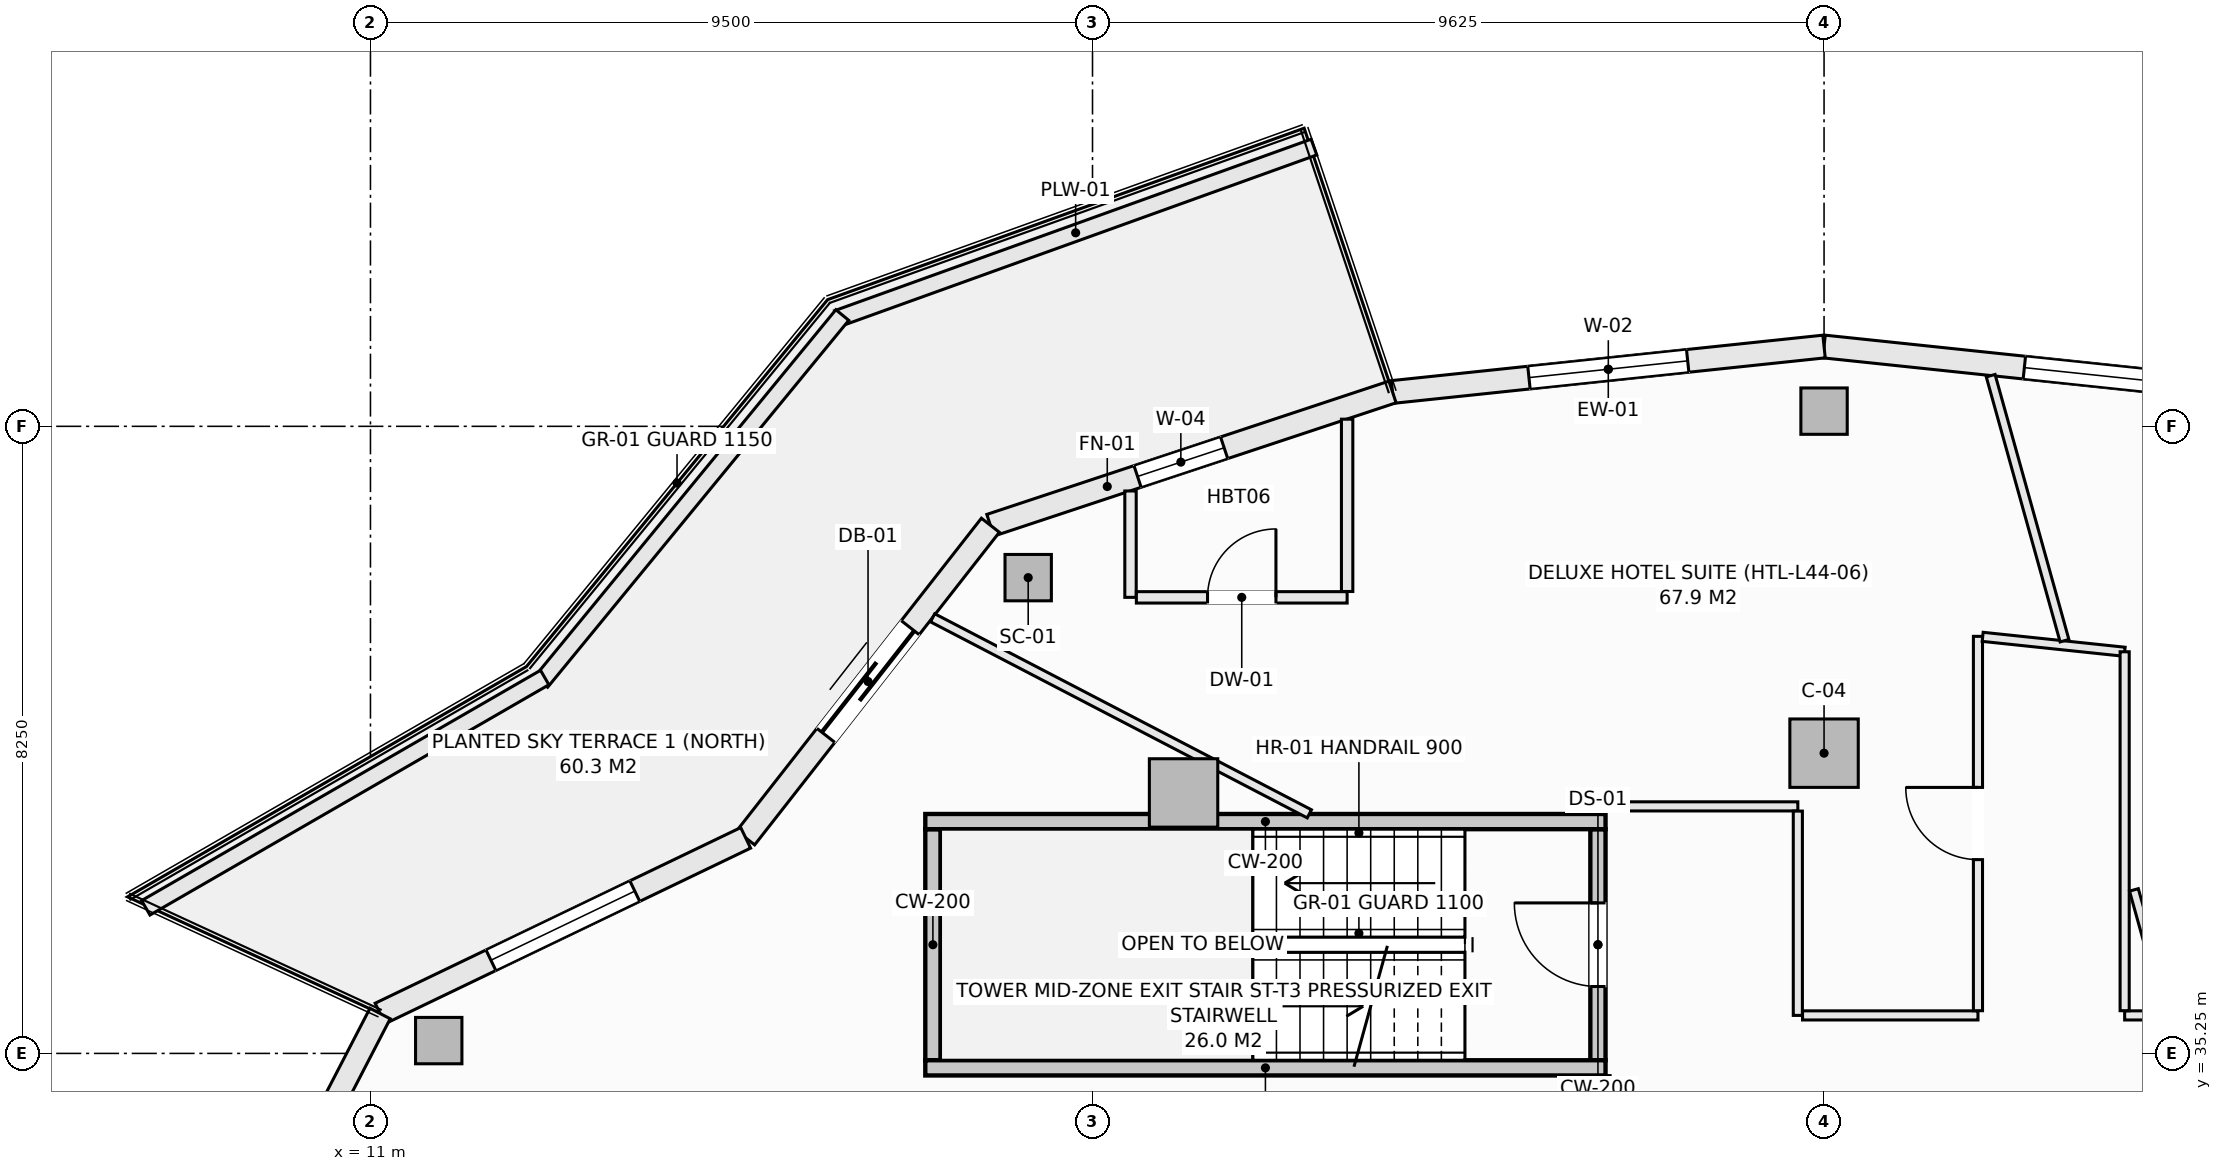
"""IFC4 building model, lengths in metres.
Left out: names, types, materials, properties, quantities, classifications, styles, units other than length and angle.
Written with IfcOpenShell. Run it as: python <this file> out.ifc"""

import sys

from ifc_helpers import new_model, si_unit, direction, frame, frame_2d, origin, origin_2d, place, context, subcontext, project, spatial, rectangle, hollow_rectangle, extrude, element, fill, save


model = new_model("IFC4")
c1 = context("Model", 3, precision=1e-05, world=origin(), true_north=direction((0.0, 1.0)))
c2 = subcontext(c1, "Body", "Model", "MODEL_VIEW")
j1 = project(units=[si_unit("LENGTHUNIT", "METRE"), si_unit("PLANEANGLEUNIT", "RADIAN")], contexts=[c1])
p1 = place(None, origin())
s1 = spatial("IfcSite", under=j1, at=p1, CompositionType="ELEMENT")
p2 = place(p1, origin())
s2 = spatial("IfcBuilding", under=s1, at=p2, CompositionType="ELEMENT")
p3 = place(p2, frame((0.0, 0.0, 169.9)))
s3 = spatial("IfcBuildingStorey", under=s2, at=p3, CompositionType="ELEMENT", Elevation=169.9)
for number, where, z_axis, x_axis in (
    (1, (30.125, 43.7, -0.27), (0.0, 0.0, 1.0), (1.0, 0.0, 0.0)),
    (2, (19.654, 41.51, -0.27), (0.0, 0.0, 1.0), (1.0, 0.0, 0.0)),
    (3, (11.898, 35.419, -0.27), (0.0, 0.0, 1.0), (1.0, 0.0, 0.0)),
):
    element("IfcColumn", number, at=place(p3, frame(where, z_axis=z_axis, x_axis=x_axis)), inside=s3, PredefinedType="COLUMN", context=c2, shape_type="SweptSolid", body=[
        extrude(hollow_rectangle(XDim=0.61, YDim=0.61, WallThickness=0.025, at=origin_2d()), origin(), (0.0, 0.0, 1.0), 3.4),
    ])
for number, where, z_axis, x_axis in (
    (4, (30.125, 39.2, -0.27), (0.0, 0.0, 1.0), (1.0, 0.0, 0.0)),
    (5, (21.698, 38.677, -0.27), (0.0, 0.0, 1.0), (1.0, 0.0, 0.0)),
):
    element("IfcColumn", number, at=place(p3, frame(where, z_axis=z_axis, x_axis=x_axis)), inside=s3, PredefinedType="COLUMN", context=c2, shape_type="SweptSolid", body=[
        extrude(rectangle(XDim=0.9, YDim=0.9, at=origin_2d()), origin(), (0.0, 0.0, 1.0), 3.4),
    ])
p4 = place(p3, frame((30.125, 44.55, 0.0), z_axis=(0.0, 0.0, 1.0), x_axis=(0.994496545245, -0.104769372887, 0.0)))
e6 = element("IfcWall", 6, at=p4, inside=s3, PredefinedType="SOLIDWALL", context=c2, shape_type="SweptSolid", body=[
    extrude(rectangle(XDim=5.709, YDim=0.3, at=frame_2d((2.854, 0.0))), origin(), (0.0, 0.0, 1.0), 2.653),
])
p5 = place(p4, frame((2.65, 0.0, 0.74)))
e7 = element("IfcOpeningElement", 7, at=p5, cuts=e6, PredefinedType="OPENING", context=c2, shape_type="SweptSolid", body=[
    extrude(rectangle(XDim=2.1, YDim=1.7, at=frame_2d((1.05, 0.85))), frame((0.0, 0.16, 0.0), z_axis=(0.0, -1.0, 0.0), x_axis=(1.0, 0.0, 0.0)), (0.0, 0.0, 1.0), 0.32),
])
p6 = place(p3, frame((24.447, 43.952, 0.0), z_axis=(0.0, 0.0, 1.0), x_axis=(0.994496545245, 0.104769372887, 0.0)))
e8 = element("IfcWall", 8, at=p6, inside=s3, PredefinedType="SOLIDWALL", context=c2, shape_type="SweptSolid", body=[
    extrude(rectangle(XDim=5.709, YDim=0.3, at=frame_2d((2.854, 0.0))), origin(), (0.0, 0.0, 1.0), 2.653),
])
p7 = place(p6, frame((1.805, 0.0, 0.74)))
e9 = element("IfcOpeningElement", 9, at=p7, cuts=e8, PredefinedType="OPENING", context=c2, shape_type="SweptSolid", body=[
    extrude(rectangle(XDim=2.1, YDim=1.7, at=frame_2d((1.05, 0.85))), frame((0.0, 0.16, 0.0), z_axis=(0.0, -1.0, 0.0), x_axis=(1.0, 0.0, 0.0)), (0.0, 0.0, 1.0), 0.32),
])
p8 = place(p3, frame((19.156, 42.199, 0.0), z_axis=(0.0, 0.0, 1.0), x_axis=(0.949246811547, 0.314532177636, 0.0)))
e10 = element("IfcWall", 10, at=p8, inside=s3, PredefinedType="SOLIDWALL", context=c2, shape_type="SweptSolid", body=[
    extrude(rectangle(XDim=5.574, YDim=0.3, at=frame_2d((2.787, 0.0))), origin(), (0.0, 0.0, 1.0), 2.653),
])
p9 = place(p8, frame((2.04, 0.0, 0.72)))
e11 = element("IfcOpeningElement", 11, at=p9, cuts=e10, PredefinedType="OPENING", context=c2, shape_type="SweptSolid", body=[
    extrude(rectangle(XDim=1.2, YDim=1.65, at=frame_2d((0.6, 0.825))), frame((0.0, 0.16, 0.0), z_axis=(0.0, -1.0, 0.0), x_axis=(1.0, 0.0, 0.0)), (0.0, 0.0, 1.0), 0.32),
])
p10 = place(p3, frame((15.937, 38.086, 0.0), z_axis=(0.0, 0.0, 1.0), x_axis=(0.616429245738, 0.787410302828, 0.0)))
e12 = element("IfcWall", 12, at=p10, inside=s3, PredefinedType="SOLIDWALL", context=c2, shape_type="SweptSolid", body=[
    extrude(rectangle(XDim=5.223, YDim=0.3, at=frame_2d((2.612, 0.0))), origin(), (0.0, 0.0, 1.0), 2.653),
])
p11 = place(p10, frame((1.712, 0.0, 0.0)))
e13 = element("IfcOpeningElement", 13, at=p11, cuts=e12, PredefinedType="OPENING", context=c2, shape_type="SweptSolid", body=[
    extrude(rectangle(XDim=1.8, YDim=2.25, at=frame_2d((0.9, 1.125))), frame((0.0, 0.16, 0.0), z_axis=(0.0, -1.0, 0.0), x_axis=(1.0, 0.0, 0.0)), (0.0, 0.0, 1.0), 0.32),
])
p12 = place(p3, frame((11.127, 35.775, 0.0), z_axis=(0.0, 0.0, 1.0), x_axis=(0.901353070301, 0.433085029363, 0.0)))
e14 = element("IfcWall", 14, at=p12, inside=s3, PredefinedType="SOLIDWALL", context=c2, shape_type="SweptSolid", body=[
    extrude(rectangle(XDim=5.336, YDim=0.3, at=frame_2d((2.668, 0.0))), origin(), (0.0, 0.0, 1.0), 2.653),
])
p13 = place(p12, frame((1.618, 0.0, 0.74)))
e15 = element("IfcOpeningElement", 15, at=p13, cuts=e14, PredefinedType="OPENING", context=c2, shape_type="SweptSolid", body=[
    extrude(rectangle(XDim=2.1, YDim=1.7, at=frame_2d((1.05, 0.85))), frame((0.0, 0.16, 0.0), z_axis=(0.0, -1.0, 0.0), x_axis=(1.0, 0.0, 0.0)), (0.0, 0.0, 1.0), 0.32),
])
p14 = place(p3, frame((8.935, 31.542, 0.0), z_axis=(0.0, 0.0, 1.0), x_axis=(0.459810251451, 0.888017191647, 0.0)))
e16 = element("IfcWall", 16, at=p14, inside=s3, PredefinedType="SOLIDWALL", context=c2, shape_type="SweptSolid", body=[
    extrude(rectangle(XDim=4.766, YDim=0.3, at=frame_2d((2.383, 0.0))), origin(), (0.0, 0.0, 1.0), 2.653),
])
p15 = place(p14, frame((1.333, 0.0, 0.74)))
e17 = element("IfcOpeningElement", 17, at=p15, cuts=e16, PredefinedType="OPENING", context=c2, shape_type="SweptSolid", body=[
    extrude(rectangle(XDim=2.1, YDim=1.7, at=frame_2d((1.05, 0.85))), frame((0.0, 0.16, 0.0), z_axis=(0.0, -1.0, 0.0), x_axis=(1.0, 0.0, 0.0)), (0.0, 0.0, 1.0), 0.32),
])
p16 = place(p3, frame((17.143, 44.918, 0.0), z_axis=(0.0, 0.0, 1.0), x_axis=(0.94094437769, 0.33856118811, 0.0)))
e18 = element("IfcWall", 18, at=p16, inside=s3, PredefinedType="PARAPET", context=c2, shape_type="SweptSolid", body=[
    extrude(rectangle(XDim=6.664, YDim=0.22, at=frame_2d((3.332, 0.0))), origin(), (0.0, 0.0, 1.0), 0.52),
])
p17 = place(p3, frame((13.246, 40.137, 0.0), z_axis=(0.0, 0.0, 1.0), x_axis=(0.634429234628, 0.77298094818, 0.0)))
e19 = element("IfcWall", 19, at=p17, inside=s3, PredefinedType="PARAPET", context=c2, shape_type="SweptSolid", body=[
    extrude(rectangle(XDim=6.245, YDim=0.22, at=frame_2d((3.123, 0.0))), origin(), (0.0, 0.0, 1.0), 0.52),
])
p18 = place(p3, frame((8.044, 37.166, 0.0), z_axis=(0.0, 0.0, 1.0), x_axis=(0.866058128659, 0.499943314571, 0.0)))
e20 = element("IfcWall", 20, at=p18, inside=s3, PredefinedType="PARAPET", context=c2, shape_type="SweptSolid", body=[
    extrude(rectangle(XDim=6.06, YDim=0.22, at=frame_2d((3.03, 0.0))), origin(), (0.0, 0.0, 1.0), 0.52),
])
p19 = place(p3, frame((27.15, 35.16, -0.27), z_axis=(0.0, 0.0, 1.0), x_axis=(0.0, 1.0, 0.0)))
e21 = element("IfcWall", 21, at=p19, inside=s3, PredefinedType="SHEAR", context=c2, shape_type="SweptSolid", body=[
    extrude(rectangle(XDim=3.04, YDim=0.2, at=frame_2d((1.52, 0.0))), origin(), (0.0, 0.0, 1.0), 3.4),
])
p20 = place(p19, frame((0.97, 0.0, 0.27)))
e22 = element("IfcOpeningElement", 22, at=p20, cuts=e21, PredefinedType="OPENING", context=c2, shape_type="SweptSolid", body=[
    extrude(rectangle(XDim=1.1, YDim=2.15, at=frame_2d((0.55, 1.075))), frame((0.0, 0.11, 0.0), z_axis=(0.0, -1.0, 0.0), x_axis=(1.0, 0.0, 0.0)), (0.0, 0.0, 1.0), 0.22),
])
p21 = place(p3, frame((18.4, 35.16, -0.27), z_axis=(0.0, 0.0, 1.0), x_axis=(0.0, 1.0, 0.0)))
e23 = element("IfcWall", 23, at=p21, inside=s3, PredefinedType="SHEAR", context=c2, shape_type="SweptSolid", body=[
    extrude(rectangle(XDim=3.04, YDim=0.2, at=frame_2d((1.52, 0.0))), origin(), (0.0, 0.0, 1.0), 3.4),
])
for number, where, z_axis, x_axis in (
    (24, (18.3, 38.3, -0.27), (0.0, 0.0, 1.0), (1.0, 0.0, 0.0)),
    (25, (18.3, 35.06, -0.27), (0.0, 0.0, 1.0), (1.0, 0.0, 0.0)),
):
    element("IfcWall", number, at=place(p3, frame(where, z_axis=z_axis, x_axis=x_axis)), inside=s3, PredefinedType="SHEAR", context=c2, shape_type="SweptSolid", body=[
        extrude(rectangle(XDim=8.95, YDim=0.2, at=frame_2d((4.475, 0.0))), origin(), (0.0, 0.0, 1.0), 3.4),
    ])
p22 = place(p3, frame((27.25, 34.152, 0.0), z_axis=(0.0, 0.0, 1.0), x_axis=(0.0, 1.0, 0.0)))
e26 = element("IfcWall", 26, at=p22, inside=s3, PredefinedType="PARTITIONING", context=c2, shape_type="SweptSolid", body=[
    extrude(rectangle(XDim=0.806, YDim=0.12, at=frame_2d((0.403, 0.0))), origin(), (0.0, 0.0, 1.0), 3.13),
])
p23 = place(p3, frame((27.25, 38.5, 0.0), z_axis=(0.0, 0.0, 1.0), x_axis=(1.0, 0.0, 0.0)))
e27 = element("IfcWall", 27, at=p23, inside=s3, PredefinedType="PARTITIONING", context=c2, shape_type="SweptSolid", body=[
    extrude(rectangle(XDim=2.53, YDim=0.12, at=frame_2d((1.265, 0.0))), origin(), (0.0, 0.0, 1.0), 3.13),
])
p24 = place(p3, frame((29.78, 35.75, 0.0), z_axis=(0.0, 0.0, 1.0), x_axis=(0.0, 1.0, 0.0)))
e28 = element("IfcWall", 28, at=p24, inside=s3, PredefinedType="PARTITIONING", context=c2, shape_type="SweptSolid", body=[
    extrude(rectangle(XDim=2.688, YDim=0.12, at=frame_2d((1.344, 0.0))), origin(), (0.0, 0.0, 1.0), 3.13),
])
p25 = place(p3, frame((29.842, 35.75, 0.0), z_axis=(0.0, 0.0, 1.0), x_axis=(1.0, 0.0, 0.0)))
e29 = element("IfcWall", 29, at=p25, inside=s3, PredefinedType="PARTITIONING", context=c2, shape_type="SweptSolid", body=[
    extrude(rectangle(XDim=2.308, YDim=0.12, at=frame_2d((1.154, 0.0))), origin(), (0.0, 0.0, 1.0), 3.13),
])
p26 = place(p3, frame((34.08, 35.75, 0.0), z_axis=(0.0, 0.0, 1.0), x_axis=(1.0, 0.0, 0.0)))
e30 = element("IfcWall", 30, at=p26, inside=s3, PredefinedType="PARTITIONING", context=c2, shape_type="SweptSolid", body=[
    extrude(rectangle(XDim=4.878, YDim=0.12, at=frame_2d((2.439, 0.0))), origin(), (0.0, 0.0, 1.0), 2.505),
])
p27 = place(p26, frame((1.485, 0.0, 0.0)))
e31 = element("IfcOpeningElement", 31, at=p27, cuts=e30, PredefinedType="OPENING", context=c2, shape_type="SweptSolid", body=[
    extrude(rectangle(XDim=0.95, YDim=2.1, at=frame_2d((0.475, 1.05))), frame((0.0, 0.07, 0.0), z_axis=(0.0, -1.0, 0.0), x_axis=(1.0, 0.0, 0.0)), (0.0, 0.0, 1.0), 0.14),
])
p28 = place(p3, frame((32.15, 35.812, 0.0), z_axis=(0.0, 0.0, 1.0), x_axis=(0.0, 1.0, 0.0)))
e32 = element("IfcWall", 32, at=p28, inside=s3, PredefinedType="PARTITIONING", context=c2, shape_type="SweptSolid", body=[
    extrude(rectangle(XDim=4.925, YDim=0.12, at=frame_2d((2.462, 0.0))), origin(), (0.0, 0.0, 1.0), 3.13),
])
p29 = place(p28, frame((1.988, 0.0, 0.0)))
e33 = element("IfcOpeningElement", 33, at=p29, cuts=e32, PredefinedType="OPENING", context=c2, shape_type="SweptSolid", body=[
    extrude(rectangle(XDim=0.95, YDim=2.1, at=frame_2d((0.475, 1.05))), frame((0.0, 0.07, 0.0), z_axis=(0.0, -1.0, 0.0), x_axis=(1.0, 0.0, 0.0)), (0.0, 0.0, 1.0), 0.14),
])
p30 = place(p3, frame((32.212, 40.73, 0.0), z_axis=(0.0, 0.0, 1.0), x_axis=(0.994511860417, -0.104623895405, 0.0)))
e34 = element("IfcWall", 34, at=p30, inside=s3, PredefinedType="PARTITIONING", context=c2, shape_type="SweptSolid", body=[
    extrude(rectangle(XDim=1.878, YDim=0.12, at=frame_2d((0.939, 0.0))), origin(), (0.0, 0.0, 1.0), 3.13),
])
p31 = place(p3, frame((34.08, 35.812, 0.0), z_axis=(0.0, 0.0, 1.0), x_axis=(0.0, 1.0, 0.0)))
e35 = element("IfcWall", 35, at=p31, inside=s3, PredefinedType="PARTITIONING", context=c2, shape_type="SweptSolid", body=[
    extrude(rectangle(XDim=4.722, YDim=0.12, at=frame_2d((2.361, 0.0))), origin(), (0.0, 0.0, 1.0), 2.812),
])
p32 = place(p3, frame((18.396, 40.981, 0.0), z_axis=(0.0, 0.0, 1.0), x_axis=(0.887120213162, -0.461538435452, 0.0)))
e36 = element("IfcWall", 36, at=p32, inside=s3, PredefinedType="PARTITIONING", context=c2, shape_type="SweptSolid", body=[
    extrude(rectangle(XDim=5.588, YDim=0.12, at=frame_2d((2.794, 0.0))), origin(), (0.0, 0.0, 1.0), 2.505),
])
p33 = place(p3, frame((32.317, 44.166, 0.0), z_axis=(0.0, 0.0, 1.0), x_axis=(0.268461316047, -0.963290465948, 0.0)))
e37 = element("IfcWall", 37, at=p33, inside=s3, PredefinedType="PARTITIONING", context=c2, shape_type="SweptSolid", body=[
    extrude(rectangle(XDim=3.619, YDim=0.12, at=frame_2d((1.81, 0.0))), origin(), (0.0, 0.0, 1.0), 3.13),
])
p34 = place(p3, frame((34.202, 37.401, 0.0), z_axis=(0.0, 0.0, 1.0), x_axis=(0.268460489063, -0.963290696422, 0.0)))
e38 = element("IfcWall", 38, at=p34, inside=s3, PredefinedType="PARTITIONING", context=c2, shape_type="SweptSolid", body=[
    extrude(rectangle(XDim=1.65, YDim=0.12, at=frame_2d((0.825, 0.0))), origin(), (0.0, 0.0, 1.0), 3.13),
])
p35 = place(p3, frame((21.0, 41.25, 0.0), z_axis=(0.0, 0.0, 1.0), x_axis=(0.0, 1.0, 0.0)))
e39 = element("IfcWall", 39, at=p35, inside=s3, PredefinedType="PARTITIONING", context=c2, shape_type="SweptSolid", body=[
    extrude(rectangle(XDim=1.399, YDim=0.15, at=frame_2d((0.7, 0.0))), origin(), (0.0, 0.0, 1.0), 3.13),
])
p36 = place(p3, frame((21.077, 41.25, 0.0), z_axis=(0.0, 0.0, 1.0), x_axis=(1.0, 0.0, 0.0)))
e40 = element("IfcWall", 40, at=p36, inside=s3, PredefinedType="PARTITIONING", context=c2, shape_type="SweptSolid", body=[
    extrude(rectangle(XDim=2.773, YDim=0.15, at=frame_2d((1.387, 0.0))), origin(), (0.0, 0.0, 1.0), 3.13),
])
p37 = place(p36, frame((0.937, 0.0, 0.0)))
e41 = element("IfcOpeningElement", 41, at=p37, cuts=e40, PredefinedType="OPENING", context=c2, shape_type="SweptSolid", body=[
    extrude(rectangle(XDim=0.9, YDim=2.1, at=frame_2d((0.45, 1.05))), frame((0.0, 0.085, 0.0), z_axis=(0.0, -1.0, 0.0), x_axis=(1.0, 0.0, 0.0)), (0.0, 0.0, 1.0), 0.17),
])
p38 = place(p3, frame((23.85, 41.327, 0.0), z_axis=(0.0, 0.0, 1.0), x_axis=(0.0, 1.0, 0.0)))
e42 = element("IfcWall", 42, at=p38, inside=s3, PredefinedType="PARTITIONING", context=c2, shape_type="SweptSolid", body=[
    extrude(rectangle(XDim=2.267, YDim=0.15, at=frame_2d((1.134, 0.0))), origin(), (0.0, 0.0, 1.0), 3.13),
])
p39 = place(p5, origin())
e43 = element("IfcWindow", 43, at=p39, inside=s3, PartitioningType="SINGLE_PANEL", PredefinedType="WINDOW", context=c2, shape_type="SweptSolid", body=[
    extrude(rectangle(XDim=2.1, YDim=1.7, at=frame_2d((1.05, 0.85))), frame((0.0, 0.03, 0.0), z_axis=(0.0, -1.0, 0.0), x_axis=(1.0, 0.0, 0.0)), (0.0, 0.0, 1.0), 0.06),
])
fill(e7, e43)
p40 = place(p7, origin())
e44 = element("IfcWindow", 44, at=p40, inside=s3, PartitioningType="SINGLE_PANEL", PredefinedType="WINDOW", context=c2, shape_type="SweptSolid", body=[
    extrude(rectangle(XDim=2.1, YDim=1.7, at=frame_2d((1.05, 0.85))), frame((0.0, 0.03, 0.0), z_axis=(0.0, -1.0, 0.0), x_axis=(1.0, 0.0, 0.0)), (0.0, 0.0, 1.0), 0.06),
])
fill(e9, e44)
p41 = place(p9, origin())
e45 = element("IfcWindow", 45, at=p41, inside=s3, PartitioningType="SINGLE_PANEL", PredefinedType="WINDOW", context=c2, shape_type="SweptSolid", body=[
    extrude(rectangle(XDim=1.2, YDim=1.65, at=frame_2d((0.6, 0.825))), frame((0.0, 0.03, 0.0), z_axis=(0.0, -1.0, 0.0), x_axis=(1.0, 0.0, 0.0)), (0.0, 0.0, 1.0), 0.06),
])
fill(e11, e45)
p42 = place(p11, origin())
e46 = element("IfcDoor", 46, at=p42, inside=s3, OperationType="SLIDING_TO_LEFT", PredefinedType="DOOR", context=c2, shape_type="SweptSolid", body=[
    extrude(rectangle(XDim=1.8, YDim=2.25, at=frame_2d((0.9, 1.125))), frame((0.0, 0.025, 0.0), z_axis=(0.0, -1.0, 0.0), x_axis=(1.0, 0.0, 0.0)), (0.0, 0.0, 1.0), 0.05),
])
fill(e13, e46)
p43 = place(p13, origin())
e47 = element("IfcWindow", 47, at=p43, inside=s3, PartitioningType="SINGLE_PANEL", PredefinedType="WINDOW", context=c2, shape_type="SweptSolid", body=[
    extrude(rectangle(XDim=2.1, YDim=1.7, at=frame_2d((1.05, 0.85))), frame((0.0, 0.03, 0.0), z_axis=(0.0, -1.0, 0.0), x_axis=(1.0, 0.0, 0.0)), (0.0, 0.0, 1.0), 0.06),
])
fill(e15, e47)
p44 = place(p20, origin())
e48 = element("IfcDoor", 48, at=p44, inside=s3, OperationType="SINGLE_SWING_RIGHT", PredefinedType="DOOR", context=c2, shape_type="SweptSolid", body=[
    extrude(rectangle(XDim=1.1, YDim=2.15, at=frame_2d((0.55, 1.075))), frame((0.0, 0.025, 0.0), z_axis=(0.0, -1.0, 0.0), x_axis=(1.0, 0.0, 0.0)), (0.0, 0.0, 1.0), 0.05),
])
fill(e22, e48)
p45 = place(p29, origin())
e49 = element("IfcDoor", 49, at=p45, inside=s3, OperationType="SINGLE_SWING_RIGHT", PredefinedType="DOOR", context=c2, shape_type="SweptSolid", body=[
    extrude(rectangle(XDim=0.95, YDim=2.1, at=frame_2d((0.475, 1.05))), frame((0.0, 0.025, 0.0), z_axis=(0.0, -1.0, 0.0), x_axis=(1.0, 0.0, 0.0)), (0.0, 0.0, 1.0), 0.05),
])
fill(e33, e49)
p46 = place(p37, origin())
e50 = element("IfcDoor", 50, at=p46, inside=s3, OperationType="SINGLE_SWING_RIGHT", PredefinedType="DOOR", context=c2, shape_type="SweptSolid", body=[
    extrude(rectangle(XDim=0.9, YDim=2.1, at=frame_2d((0.45, 1.05))), frame((0.0, 0.025, 0.0), z_axis=(0.0, -1.0, 0.0), x_axis=(1.0, 0.0, 0.0)), (0.0, 0.0, 1.0), 0.05),
])
fill(e41, e50)
save(model, sys.argv[1])
